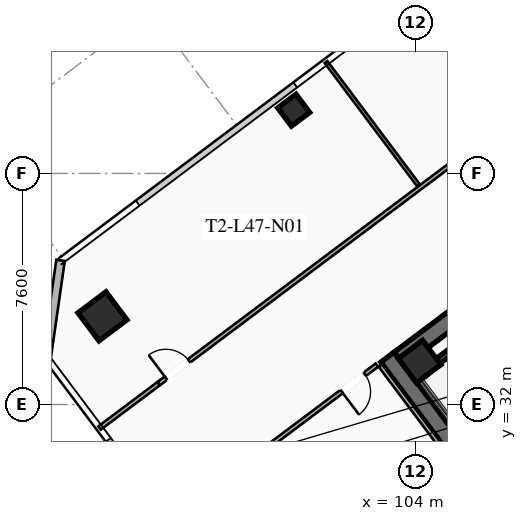
"""IFC4 building model, lengths in metres.
Left out: names, types, materials, properties, quantities, classifications, styles, units other than length and angle.
Written with IfcOpenShell. Run it as: python <this file> out.ifc"""

import sys

from ifc_helpers import new_model, si_unit, direction, frame, frame_2d, origin, origin_2d, place, context, subcontext, project, spatial, rectangle, hollow_rectangle, extrude, element, fill, save


model = new_model("IFC4")
c1 = context("Model", 3, precision=1e-05, world=origin(), true_north=direction((0.0, 1.0)))
c2 = subcontext(c1, "Body", "Model", "MODEL_VIEW")
j1 = project(units=[si_unit("LENGTHUNIT", "METRE"), si_unit("PLANEANGLEUNIT", "RADIAN")], contexts=[c1])
p1 = place(None, origin())
s1 = spatial("IfcSite", under=j1, at=p1, CompositionType="ELEMENT")
p2 = place(p1, origin())
s2 = spatial("IfcBuilding", under=s1, at=p2, CompositionType="ELEMENT")
p3 = place(p2, frame((0.0, 0.0, 174.75)))
s3 = spatial("IfcBuildingStorey", under=s2, at=p3, CompositionType="ELEMENT", Elevation=174.75)
p4 = place(p3, frame((112.436, 21.077, 0.0), z_axis=(0.0, 0.0, 1.0), x_axis=(-0.600005007985, 0.799996243986, 0.0)))
e1 = element("IfcWall", 1, at=p4, inside=s3, PredefinedType="SHEAR", context=c2, shape_type="SweptSolid", body=[
    extrude(rectangle(XDim=15.6, YDim=0.55, at=frame_2d((7.8, 0.0))), origin(), (0.0, 0.0, 1.0), 3.55),
])
p5 = place(p3, frame((103.461, 33.502, 0.0), z_axis=(0.0, 0.0, 1.0), x_axis=(0.799998054672, 0.600002593761, 0.0)))
e2 = element("IfcWall", 2, at=p5, inside=s3, PredefinedType="SHEAR", context=c2, shape_type="SweptSolid", body=[
    extrude(rectangle(XDim=15.06, YDim=0.55, at=frame_2d((7.53, 0.0))), origin(), (0.0, 0.0, 1.0), 3.55),
])
p6 = place(p5, frame((4.58, 0.0, 0.0)))
e3 = element("IfcOpeningElement", 3, at=p6, cuts=e2, PredefinedType="OPENING", context=c2, shape_type="SweptSolid", body=[
    extrude(rectangle(XDim=1.25, YDim=2.25, at=frame_2d((0.625, 1.125))), frame((0.0, 0.285, 0.0), z_axis=(0.0, -1.0, 0.0), x_axis=(1.0, 0.0, 0.0)), (0.0, 0.0, 1.0), 0.57),
])
p7 = place(p5, frame((9.63, 0.0, 0.0)))
e4 = element("IfcOpeningElement", 4, at=p7, cuts=e2, PredefinedType="OPENING", context=c2, shape_type="SweptSolid", body=[
    extrude(rectangle(XDim=1.25, YDim=2.25, at=frame_2d((0.625, 1.125))), frame((0.0, 0.285, 0.0), z_axis=(0.0, -1.0, 0.0), x_axis=(1.0, 0.0, 0.0)), (0.0, 0.0, 1.0), 0.57),
])
p8 = place(p3, frame((104.13, 33.41, 0.0), z_axis=(0.0, 0.0, 1.0), x_axis=(0.799999996291, 0.600000004945, 0.0)))
e5 = element("IfcColumn", 5, at=p8, inside=s3, PredefinedType="COLUMN", context=c2, shape_type="SweptSolid", body=[
    extrude(hollow_rectangle(XDim=1.0, YDim=1.0, WallThickness=0.04, at=origin_2d()), origin(), (0.0, 0.0, 1.0), 3.37),
])
p9 = place(p3, frame((93.7, 34.9, 0.0), z_axis=(0.0, 0.0, 1.0), x_axis=(0.799999996291, 0.600000004945, 0.0)))
e6 = element("IfcColumn", 6, at=p9, inside=s3, PredefinedType="COLUMN", context=c2, shape_type="SweptSolid", body=[
    extrude(hollow_rectangle(XDim=1.15, YDim=1.15, WallThickness=0.045, at=origin_2d()), origin(), (0.0, 0.0, 1.0), 3.37),
])
p10 = place(p3, frame((99.99, 41.68, 0.0), z_axis=(0.0, 0.0, 1.0), x_axis=(0.799999996291, 0.600000004945, 0.0)))
e7 = element("IfcColumn", 7, at=p10, inside=s3, PredefinedType="COLUMN", context=c2, shape_type="SweptSolid", body=[
    extrude(hollow_rectangle(XDim=0.75, YDim=0.75, WallThickness=0.032, at=origin_2d()), origin(), (0.0, 0.0, 1.0), 3.37),
])
p11 = place(p3, frame((91.86, 33.52, 0.0), z_axis=(0.0, 0.0, 1.0), x_axis=(0.141410847992, 0.989950994782, 0.0)))
e8 = element("IfcWall", 8, at=p11, inside=s3, PredefinedType="SOLIDWALL", context=c2, shape_type="SweptSolid", body=[
    extrude(rectangle(XDim=3.253, YDim=0.28, at=frame_2d((1.626, 0.0))), origin(), (0.0, 0.0, 1.0), 3.37),
])
p12 = place(p3, frame((103.956, 32.842, 0.0), z_axis=(0.0, 0.0, 1.0), x_axis=(0.800015298837, 0.599979601008, 0.0)))
e9 = element("IfcWall", 9, at=p12, inside=s3, PredefinedType="SHEAR", context=c2, shape_type="SweptSolid", body=[
    extrude(rectangle(XDim=3.83, YDim=0.2, at=frame_2d((1.915, 0.0))), origin(), (0.0, 0.0, 1.0), 3.37),
])
p13 = place(p3, frame((95.548, 32.686, 0.0), z_axis=(0.0, 0.0, 1.0), x_axis=(0.8, 0.6, 0.0)))
e10 = element("IfcWall", 10, at=p13, inside=s3, PredefinedType="PARTITIONING", context=c2, shape_type="SweptSolid", body=[
    extrude(rectangle(XDim=28.7, YDim=0.135, at=frame_2d((14.35, 0.0))), origin(), (0.0, 0.0, 1.0), 2.723),
])
p14 = place(p13, frame((0.3, 0.0, 0.0)))
e11 = element("IfcOpeningElement", 11, at=p14, cuts=e10, PredefinedType="OPENING", context=c2, shape_type="SweptSolid", body=[
    extrude(rectangle(XDim=0.95, YDim=2.05, at=frame_2d((0.475, 1.025))), frame((0.0, 0.077, 0.0), z_axis=(0.0, -1.0, 0.0), x_axis=(1.0, 0.0, 0.0)), (0.0, 0.0, 1.0), 0.155),
])
p15 = place(p13, frame((27.45, 0.0, 0.0)))
e12 = element("IfcOpeningElement", 12, at=p15, cuts=e10, PredefinedType="OPENING", context=c2, shape_type="SweptSolid", body=[
    extrude(rectangle(XDim=0.95, YDim=2.05, at=frame_2d((0.475, 1.025))), frame((0.0, 0.077, 0.0), z_axis=(0.0, -1.0, 0.0), x_axis=(1.0, 0.0, 0.0)), (0.0, 0.0, 1.0), 0.155),
])
p16 = place(p3, frame((93.604, 31.228, 0.0), z_axis=(0.0, 0.0, 1.0), x_axis=(0.800012055778, 0.599983925293, 0.0)))
e13 = element("IfcWall", 13, at=p16, inside=s3, PredefinedType="PARTITIONING", context=c2, shape_type="SweptSolid", body=[
    extrude(rectangle(XDim=2.43, YDim=0.135, at=frame_2d((1.215, 0.0))), origin(), (0.0, 0.0, 1.0), 2.723),
])
p17 = place(p3, frame((104.1, 39.2, 0.0), z_axis=(0.0, 0.0, 1.0), x_axis=(-0.600015378737, 0.799988465716, 0.0)))
e14 = element("IfcWall", 14, at=p17, inside=s3, PredefinedType="PARTITIONING", context=c2, shape_type="SweptSolid", body=[
    extrude(rectangle(XDim=5.08, YDim=0.11, at=frame_2d((2.54, 0.0))), origin(), (0.0, 0.0, 1.0), 2.723),
])
p18 = place(p3, frame((112.104, 20.928, 0.0), z_axis=(0.0, 0.0, 1.0), x_axis=(-0.599994940075, 0.800003794918, 0.0)))
e15 = element("IfcWall", 15, at=p18, inside=s3, PredefinedType="PARTITIONING", context=c2, shape_type="SweptSolid", body=[
    extrude(rectangle(XDim=15.44, YDim=0.135, at=frame_2d((7.72, 0.0))), origin(), (0.0, 0.0, 1.0), 2.723),
])
p19 = place(p3, frame((102.728, 33.296, 0.0), z_axis=(0.0, 0.0, 1.0), x_axis=(-0.8, -0.6, 0.0)))
e16 = element("IfcWall", 16, at=p19, inside=s3, PredefinedType="PARTITIONING", context=c2, shape_type="SweptSolid", body=[
    extrude(rectangle(XDim=8.39, YDim=0.135, at=frame_2d((4.195, 0.0))), origin(), (0.0, 0.0, 1.0), 2.723),
])
p20 = place(p19, frame((0.5, 0.0, 0.0)))
e17 = element("IfcOpeningElement", 17, at=p20, cuts=e16, PredefinedType="OPENING", context=c2, shape_type="SweptSolid", body=[
    extrude(rectangle(XDim=0.95, YDim=2.05, at=frame_2d((0.475, 1.025))), frame((0.0, 0.077, 0.0), z_axis=(0.0, -1.0, 0.0), x_axis=(1.0, 0.0, 0.0)), (0.0, 0.0, 1.0), 0.155),
])
p21 = place(p14, origin())
e18 = element("IfcDoor", 18, at=p21, inside=s3, OperationType="SINGLE_SWING_LEFT", PredefinedType="DOOR", context=c2, shape_type="SweptSolid", body=[
    extrude(rectangle(XDim=0.95, YDim=2.05, at=frame_2d((0.475, 1.025))), frame((0.0, 0.025, 0.0), z_axis=(0.0, -1.0, 0.0), x_axis=(1.0, 0.0, 0.0)), (0.0, 0.0, 1.0), 0.05),
])
fill(e11, e18)
p22 = place(p20, origin())
e19 = element("IfcDoor", 19, at=p22, inside=s3, OperationType="SINGLE_SWING_RIGHT", PredefinedType="DOOR", context=c2, shape_type="SweptSolid", body=[
    extrude(rectangle(XDim=0.95, YDim=2.05, at=frame_2d((0.475, 1.025))), frame((0.0, 0.025, 0.0), z_axis=(0.0, -1.0, 0.0), x_axis=(1.0, 0.0, 0.0)), (0.0, 0.0, 1.0), 0.05),
])
fill(e17, e19)
save(model, sys.argv[1])
